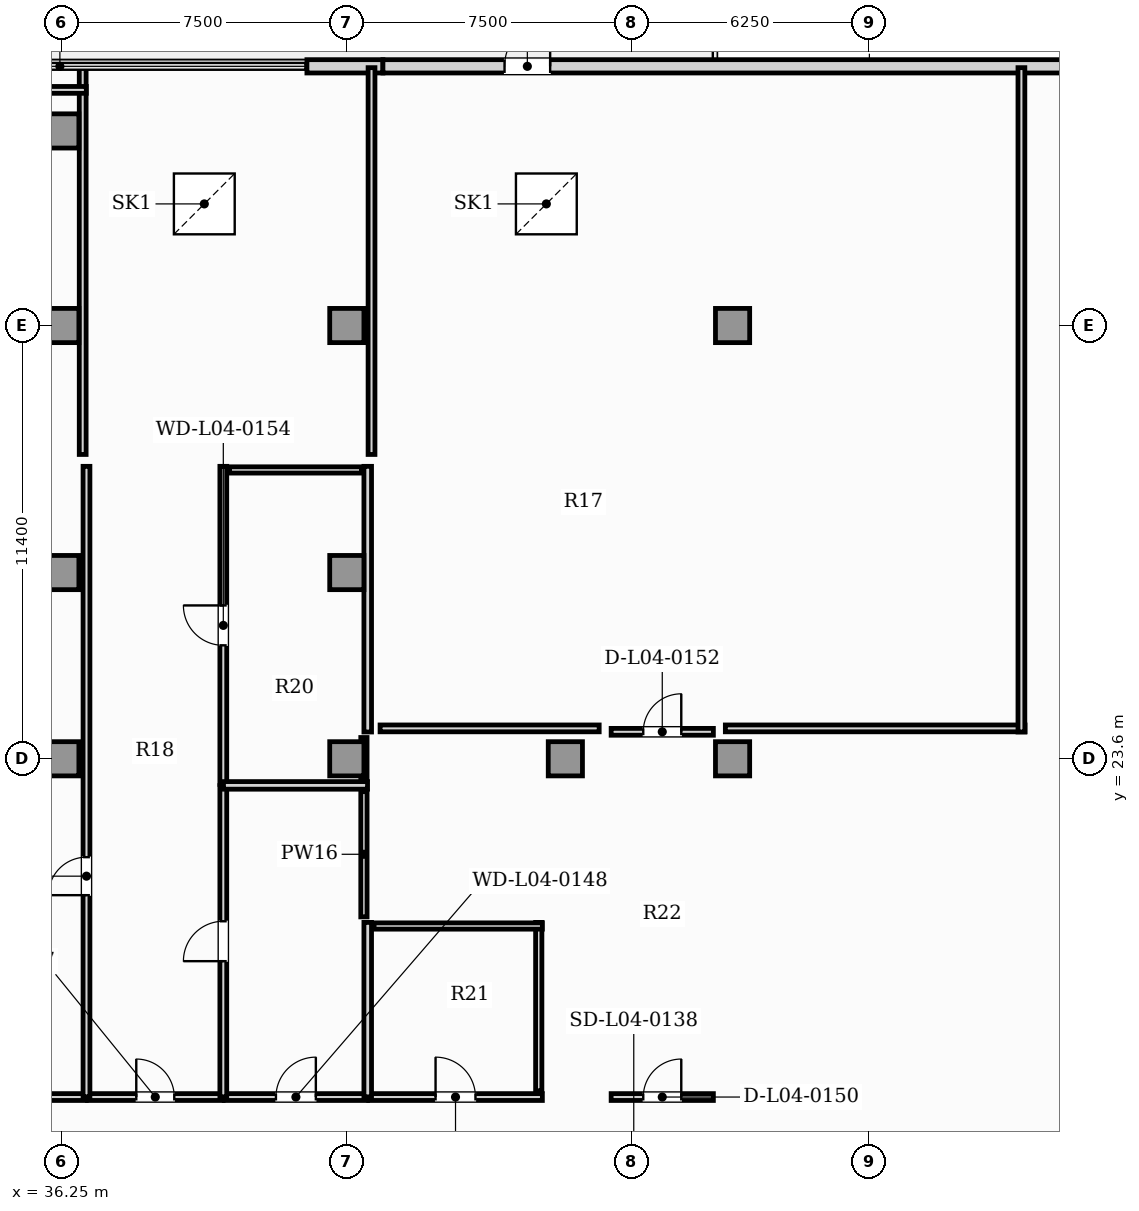
"""IFC4 building model, lengths in metres.
Left out: names, types, materials, properties, quantities, classifications, styles, units other than length and angle.
Written with IfcOpenShell. Run it as: python <this file> out.ifc"""

import sys

from ifc_helpers import new_model, si_unit, direction, frame, frame_2d, origin, origin_2d, place, context, subcontext, project, spatial, rectangle, extrude, element, fill, save


model = new_model("IFC4")
c1 = context("Model", 3, precision=1e-05, world=origin(), true_north=direction((0.0, 1.0)))
c2 = subcontext(c1, "Body", "Model", "MODEL_VIEW")
j1 = project(units=[si_unit("LENGTHUNIT", "METRE"), si_unit("PLANEANGLEUNIT", "RADIAN")], contexts=[c1])
p1 = place(None, origin())
s1 = spatial("IfcSite", under=j1, at=p1, CompositionType="ELEMENT")
p2 = place(p1, origin())
s2 = spatial("IfcBuilding", under=s1, at=p2, CompositionType="ELEMENT")
p3 = place(p2, frame((0.0, 0.0, 19.8)))
s3 = spatial("IfcBuildingStorey", under=s2, at=p3, CompositionType="ELEMENT", Elevation=19.8)
for number, where, z_axis, x_axis in (
    (1, (43.75, 23.6, 0.0), (0.0, 0.0, 1.0), (1.0, 0.0, 0.0)),
    (2, (43.75, 35.0, 0.0), (0.0, 0.0, 1.0), (1.0, 0.0, 0.0)),
    (3, (53.9, 23.6, 0.0), (0.0, 0.0, 1.0), (1.0, 0.0, 0.0)),
    (4, (53.9, 35.0, 0.0), (0.0, 0.0, 1.0), (1.0, 0.0, 0.0)),
    (5, (36.25, 23.6, 0.0), (0.0, 0.0, 1.0), (1.0, 0.0, 0.0)),
    (6, (49.5, 23.6, 0.0), (0.0, 0.0, 1.0), (1.0, 0.0, 0.0)),
    (7, (36.25, 28.5, 0.0), (0.0, 0.0, 1.0), (1.0, 0.0, 0.0)),
    (8, (43.75, 28.5, 0.0), (0.0, 0.0, 1.0), (1.0, 0.0, 0.0)),
    (9, (36.25, 35.0, 0.0), (0.0, 0.0, 1.0), (1.0, 0.0, 0.0)),
    (10, (36.25, 40.12, 0.0), (0.0, 0.0, 1.0), (1.0, 0.0, 0.0)),
):
    element("IfcColumn", number, at=place(p3, frame(where, z_axis=z_axis, x_axis=x_axis)), inside=s3, PredefinedType="COLUMN", context=c2, shape_type="SweptSolid", body=[
        extrude(rectangle(XDim=0.9, YDim=0.9, at=origin_2d()), origin(), (0.0, 0.0, 1.0), 4.8),
    ])
p4 = place(p3, frame((42.7, 41.82, 0.0), z_axis=(0.0, 0.0, 1.0), x_axis=(1.0, 0.0, 0.0)))
e11 = element("IfcWall", 11, at=p4, inside=s3, PredefinedType="SOLIDWALL", context=c2, shape_type="SweptSolid", body=[
    extrude(rectangle(XDim=2.0, YDim=0.35, at=frame_2d((1.0, 0.0))), origin(), (0.0, 0.0, 1.0), 4.4),
])
p5 = place(p3, frame((44.7, 41.82, 0.0), z_axis=(0.0, 0.0, 1.0), x_axis=(1.0, 0.0, 0.0)))
e12 = element("IfcWall", 12, at=p5, inside=s3, PredefinedType="SOLIDWALL", context=c2, shape_type="SweptSolid", body=[
    extrude(rectangle(XDim=21.96, YDim=0.35, at=frame_2d((10.98, 0.0))), origin(), (0.0, 0.0, 1.0), 4.4),
])
p6 = place(p5, frame((3.2, 0.0, 0.0)))
e13 = element("IfcOpeningElement", 13, at=p6, cuts=e12, PredefinedType="OPENING", context=c2, shape_type="SweptSolid", body=[
    extrude(rectangle(XDim=1.2, YDim=2.2, at=frame_2d((0.6, 1.1))), frame((0.0, 0.185, 0.0), z_axis=(0.0, -1.0, 0.0), x_axis=(1.0, 0.0, 0.0)), (0.0, 0.0, 1.0), 0.37),
])
p7 = place(p3, frame((13.225, 14.7, 0.0), z_axis=(0.0, 0.0, 1.0), x_axis=(1.0, 0.0, 0.0)))
e14 = element("IfcWall", 14, at=p7, inside=s3, PredefinedType="PARTITIONING", context=c2, shape_type="SweptSolid", body=[
    extrude(rectangle(XDim=23.67, YDim=0.18, at=frame_2d((11.835, 0.0))), origin(), (0.0, 0.0, 1.0), 4.4),
])
p8 = place(p7, frame((11.335, 0.0, 0.0)))
e15 = element("IfcOpeningElement", 15, at=p8, cuts=e14, PredefinedType="OPENING", context=c2, shape_type="SweptSolid", body=[
    extrude(rectangle(XDim=1.0, YDim=2.15, at=frame_2d((0.5, 1.075))), frame((0.0, 0.1, 0.0), z_axis=(0.0, -1.0, 0.0), x_axis=(1.0, 0.0, 0.0)), (0.0, 0.0, 1.0), 0.2),
])
p9 = place(p3, frame((36.925, 14.7, 0.0), z_axis=(0.0, 0.0, 1.0), x_axis=(1.0, 0.0, 0.0)))
e16 = element("IfcWall", 16, at=p9, inside=s3, PredefinedType="PARTITIONING", context=c2, shape_type="SweptSolid", body=[
    extrude(rectangle(XDim=3.57, YDim=0.18, at=frame_2d((1.785, 0.0))), origin(), (0.0, 0.0, 1.0), 4.4),
])
p10 = place(p9, frame((1.285, 0.0, 0.0)))
e17 = element("IfcOpeningElement", 17, at=p10, cuts=e16, PredefinedType="OPENING", context=c2, shape_type="SweptSolid", body=[
    extrude(rectangle(XDim=1.0, YDim=2.15, at=frame_2d((0.5, 1.075))), frame((0.0, 0.1, 0.0), z_axis=(0.0, -1.0, 0.0), x_axis=(1.0, 0.0, 0.0)), (0.0, 0.0, 1.0), 0.2),
])
p11 = place(p3, frame((40.525, 14.7, 0.0), z_axis=(0.0, 0.0, 1.0), x_axis=(1.0, 0.0, 0.0)))
e18 = element("IfcWall", 18, at=p11, inside=s3, PredefinedType="PARTITIONING", context=c2, shape_type="SweptSolid", body=[
    extrude(rectangle(XDim=3.77, YDim=0.18, at=frame_2d((1.885, 0.0))), origin(), (0.0, 0.0, 1.0), 4.4),
])
p12 = place(p11, frame((1.36, 0.0, 0.0)))
e19 = element("IfcOpeningElement", 19, at=p12, cuts=e18, PredefinedType="OPENING", context=c2, shape_type="SweptSolid", body=[
    extrude(rectangle(XDim=1.05, YDim=2.15, at=frame_2d((0.525, 1.075))), frame((0.0, 0.1, 0.0), z_axis=(0.0, -1.0, 0.0), x_axis=(1.0, 0.0, 0.0)), (0.0, 0.0, 1.0), 0.2),
])
p13 = place(p3, frame((44.325, 14.7, 0.0), z_axis=(0.0, 0.0, 1.0), x_axis=(1.0, 0.0, 0.0)))
e20 = element("IfcWall", 20, at=p13, inside=s3, PredefinedType="PARTITIONING", context=c2, shape_type="SweptSolid", body=[
    extrude(rectangle(XDim=4.57, YDim=0.18, at=frame_2d((2.285, 0.0))), origin(), (0.0, 0.0, 1.0), 4.4),
])
p14 = place(p13, frame((1.76, 0.0, 0.0)))
e21 = element("IfcOpeningElement", 21, at=p14, cuts=e20, PredefinedType="OPENING", context=c2, shape_type="SweptSolid", body=[
    extrude(rectangle(XDim=1.05, YDim=2.15, at=frame_2d((0.525, 1.075))), frame((0.0, 0.1, 0.0), z_axis=(0.0, -1.0, 0.0), x_axis=(1.0, 0.0, 0.0)), (0.0, 0.0, 1.0), 0.2),
])
p15 = place(p3, frame((50.705, 14.7, 0.0), z_axis=(0.0, 0.0, 1.0), x_axis=(1.0, 0.0, 0.0)))
e22 = element("IfcWall", 22, at=p15, inside=s3, PredefinedType="PARTITIONING", context=c2, shape_type="SweptSolid", body=[
    extrude(rectangle(XDim=2.69, YDim=0.18, at=frame_2d((1.345, 0.0))), origin(), (0.0, 0.0, 1.0), 4.4),
])
p16 = place(p15, frame((0.845, 0.0, 0.0)))
e23 = element("IfcOpeningElement", 23, at=p16, cuts=e22, PredefinedType="OPENING", context=c2, shape_type="SweptSolid", body=[
    extrude(rectangle(XDim=1.0, YDim=2.15, at=frame_2d((0.5, 1.075))), frame((0.0, 0.1, 0.0), z_axis=(0.0, -1.0, 0.0), x_axis=(1.0, 0.0, 0.0)), (0.0, 0.0, 1.0), 0.2),
])
p17 = place(p3, frame((36.9, 14.705, 0.0), z_axis=(0.0, 0.0, 1.0), x_axis=(0.0, 1.0, 0.0)))
e24 = element("IfcWall", 24, at=p17, inside=s3, PredefinedType="PARTITIONING", context=c2, shape_type="SweptSolid", body=[
    extrude(rectangle(XDim=16.59, YDim=0.18, at=frame_2d((8.295, 0.0))), origin(), (0.0, 0.0, 1.0), 4.4),
])
p18 = place(p17, frame((5.306, 0.0, 0.0)))
e25 = element("IfcOpeningElement", 25, at=p18, cuts=e24, PredefinedType="OPENING", context=c2, shape_type="SweptSolid", body=[
    extrude(rectangle(XDim=1.0, YDim=2.15, at=frame_2d((0.5, 1.075))), frame((0.0, 0.1, 0.0), z_axis=(0.0, -1.0, 0.0), x_axis=(1.0, 0.0, 0.0)), (0.0, 0.0, 1.0), 0.2),
])
p19 = place(p3, frame((44.3, 24.305, 0.0), z_axis=(0.0, 0.0, 1.0), x_axis=(0.0, 1.0, 0.0)))
e26 = element("IfcWall", 26, at=p19, inside=s3, PredefinedType="PARTITIONING", context=c2, shape_type="SweptSolid", body=[
    extrude(rectangle(XDim=6.99, YDim=0.2, at=frame_2d((3.495, 0.0))), origin(), (0.0, 0.0, 1.0), 4.4),
])
p20 = place(p3, frame((50.705, 24.31, 0.0), z_axis=(0.0, 0.0, 1.0), x_axis=(1.0, 0.0, 0.0)))
e27 = element("IfcWall", 27, at=p20, inside=s3, PredefinedType="PARTITIONING", context=c2, shape_type="SweptSolid", body=[
    extrude(rectangle(XDim=2.69, YDim=0.18, at=frame_2d((1.345, 0.0))), origin(), (0.0, 0.0, 1.0), 4.4),
])
p21 = place(p20, frame((0.845, 0.0, 0.0)))
e28 = element("IfcOpeningElement", 28, at=p21, cuts=e27, PredefinedType="OPENING", context=c2, shape_type="SweptSolid", body=[
    extrude(rectangle(XDim=1.0, YDim=2.15, at=frame_2d((0.5, 1.075))), frame((0.0, 0.1, 0.0), z_axis=(0.0, -1.0, 0.0), x_axis=(1.0, 0.0, 0.0)), (0.0, 0.0, 1.0), 0.2),
])
p22 = place(p3, frame((40.5, 14.705, 0.0), z_axis=(0.0, 0.0, 1.0), x_axis=(0.0, 1.0, 0.0)))
e29 = element("IfcWall", 29, at=p22, inside=s3, PredefinedType="PARTITIONING", context=c2, shape_type="SweptSolid", body=[
    extrude(rectangle(XDim=8.19, YDim=0.18, at=frame_2d((4.095, 0.0))), origin(), (0.0, 0.0, 1.0), 4.4),
])
p23 = place(p22, frame((3.57, 0.0, 0.0)))
e30 = element("IfcOpeningElement", 30, at=p23, cuts=e29, PredefinedType="OPENING", context=c2, shape_type="SweptSolid", body=[
    extrude(rectangle(XDim=1.05, YDim=2.15, at=frame_2d((0.525, 1.075))), frame((0.0, 0.1, 0.0), z_axis=(0.0, -1.0, 0.0), x_axis=(1.0, 0.0, 0.0)), (0.0, 0.0, 1.0), 0.2),
])
p24 = place(p3, frame((40.5, 22.925, 0.0), z_axis=(0.0, 0.0, 1.0), x_axis=(0.0, 1.0, 0.0)))
e31 = element("IfcWall", 31, at=p24, inside=s3, PredefinedType="PARTITIONING", context=c2, shape_type="SweptSolid", body=[
    extrude(rectangle(XDim=8.37, YDim=0.18, at=frame_2d((4.185, 0.0))), origin(), (0.0, 0.0, 1.0), 4.4),
])
p25 = place(p24, frame((3.66, 0.0, 0.0)))
e32 = element("IfcOpeningElement", 32, at=p25, cuts=e31, PredefinedType="OPENING", context=c2, shape_type="SweptSolid", body=[
    extrude(rectangle(XDim=1.05, YDim=2.15, at=frame_2d((0.525, 1.075))), frame((0.0, 0.1, 0.0), z_axis=(0.0, -1.0, 0.0), x_axis=(1.0, 0.0, 0.0)), (0.0, 0.0, 1.0), 0.2),
])
p26 = place(p3, frame((40.505, 22.9, 0.0), z_axis=(0.0, 0.0, 1.0), x_axis=(1.0, 0.0, 0.0)))
e33 = element("IfcWall", 33, at=p26, inside=s3, PredefinedType="PARTITIONING", context=c2, shape_type="SweptSolid", body=[
    extrude(rectangle(XDim=3.79, YDim=0.2, at=frame_2d((1.895, 0.0))), origin(), (0.0, 0.0, 1.0), 4.4),
])
p27 = place(p3, frame((44.3, 14.705, 0.0), z_axis=(0.0, 0.0, 1.0), x_axis=(0.0, 1.0, 0.0)))
e34 = element("IfcWall", 34, at=p27, inside=s3, PredefinedType="PARTITIONING", context=c2, shape_type="SweptSolid", body=[
    extrude(rectangle(XDim=4.59, YDim=0.2, at=frame_2d((2.295, 0.0))), origin(), (0.0, 0.0, 1.0), 4.4),
])
p28 = place(p3, frame((36.8, 31.607, 0.0), z_axis=(0.0, 0.0, 1.0), x_axis=(0.0, 1.0, 0.0)))
e35 = element("IfcWall", 35, at=p28, inside=s3, PredefinedType="PARTITIONING", context=c2, shape_type="SweptSolid", body=[
    extrude(rectangle(XDim=10.195, YDim=0.18, at=frame_2d((5.097, 0.0))), origin(), (0.0, 0.0, 1.0), 4.4),
])
p29 = place(p3, frame((36.895, 41.2, 0.0), z_axis=(0.0, 0.0, 1.0), x_axis=(-1.0, 0.0, 0.0)))
e36 = element("IfcWall", 36, at=p29, inside=s3, PredefinedType="PARTITIONING", context=c2, shape_type="SweptSolid", body=[
    extrude(rectangle(XDim=6.206, YDim=0.18, at=frame_2d((3.103, 0.0))), origin(), (0.0, 0.0, 1.0), 4.4),
])
p30 = place(p3, frame((44.625, 24.4, 0.0), z_axis=(0.0, 0.0, 1.0), x_axis=(1.0, 0.0, 0.0)))
e37 = element("IfcWall", 37, at=p30, inside=s3, PredefinedType="PARTITIONING", context=c2, shape_type="SweptSolid", body=[
    extrude(rectangle(XDim=5.765, YDim=0.18, at=frame_2d((2.883, 0.0))), origin(), (0.0, 0.0, 1.0), 4.4),
])
p31 = place(p3, frame((53.71, 24.4, 0.0), z_axis=(0.0, 0.0, 1.0), x_axis=(1.0, 0.0, 0.0)))
e38 = element("IfcWall", 38, at=p31, inside=s3, PredefinedType="PARTITIONING", context=c2, shape_type="SweptSolid", body=[
    extrude(rectangle(XDim=7.885, YDim=0.18, at=frame_2d((3.942, 0.0))), origin(), (0.0, 0.0, 1.0), 4.4),
])
p32 = place(p3, frame((61.5, 24.305, 0.0), z_axis=(0.0, 0.0, 1.0), x_axis=(0.0, 1.0, 0.0)))
e39 = element("IfcWall", 39, at=p32, inside=s3, PredefinedType="PARTITIONING", context=c2, shape_type="SweptSolid", body=[
    extrude(rectangle(XDim=17.48, YDim=0.18, at=frame_2d((8.74, 0.0))), origin(), (0.0, 0.0, 1.0), 4.4),
])
p33 = place(p3, frame((44.4, 41.785, 0.0), z_axis=(0.0, 0.0, 1.0), x_axis=(0.0, -1.0, 0.0)))
e40 = element("IfcWall", 40, at=p33, inside=s3, PredefinedType="PARTITIONING", context=c2, shape_type="SweptSolid", body=[
    extrude(rectangle(XDim=10.177, YDim=0.18, at=frame_2d((5.089, 0.0))), origin(), (0.0, 0.0, 1.0), 4.4),
])
p34 = place(p3, frame((44.2, 19.44, 0.0), z_axis=(0.0, 0.0, 1.0), x_axis=(0.0, 1.0, 0.0)))
e41 = element("IfcWall", 41, at=p34, inside=s3, PredefinedType="PLUMBINGWALL", context=c2, shape_type="SweptSolid", body=[
    extrude(rectangle(XDim=3.295, YDim=0.165, at=frame_2d((1.647, 0.0))), origin(), (0.0, 0.0, 1.0), 4.4),
])
p35 = place(p3, frame((44.2, 23.065, 0.0), z_axis=(0.0, 0.0, 1.0), x_axis=(0.0, 1.0, 0.0)))
e42 = element("IfcWall", 42, at=p35, inside=s3, PredefinedType="PLUMBINGWALL", context=c2, shape_type="SweptSolid", body=[
    extrude(rectangle(XDim=1.095, YDim=0.165, at=frame_2d((0.547, 0.0))), origin(), (0.0, 0.0, 1.0), 4.4),
])
p36 = place(p3, frame((44.135, 31.2, 0.0), z_axis=(0.0, 0.0, 1.0), x_axis=(-1.0, 0.0, 0.0)))
e43 = element("IfcWall", 43, at=p36, inside=s3, PredefinedType="PLUMBINGWALL", context=c2, shape_type="SweptSolid", body=[
    extrude(rectangle(XDim=3.47, YDim=0.165, at=frame_2d((1.735, 0.0))), origin(), (0.0, 0.0, 1.0), 4.4),
])
for number, where, z_axis, x_axis in (
    (44, (48.8, 14.865, 0.0), (0.0, 0.0, 1.0), (0.0, 1.0, 0.0)),
    (45, (48.895, 19.2, 0.0), (0.0, 0.0, 1.0), (-1.0, 0.0, 0.0)),
):
    element("IfcWall", number, at=place(p3, frame(where, z_axis=z_axis, x_axis=x_axis)), inside=s3, PredefinedType="PLUMBINGWALL", context=c2, shape_type="SweptSolid", body=[
        extrude(rectangle(XDim=4.43, YDim=0.165, at=frame_2d((2.215, 0.0))), origin(), (0.0, 0.0, 1.0), 4.4),
    ])
p37 = place(p6, origin())
e46 = element("IfcDoor", 46, at=p37, inside=s3, OperationType="SINGLE_SWING_RIGHT", PredefinedType="DOOR", context=c2, shape_type="SweptSolid", body=[
    extrude(rectangle(XDim=1.2, YDim=2.2, at=frame_2d((0.6, 1.1))), frame((0.0, 0.025, 0.0), z_axis=(0.0, -1.0, 0.0), x_axis=(1.0, 0.0, 0.0)), (0.0, 0.0, 1.0), 0.05),
])
fill(e13, e46)
p38 = place(p3, frame((0.0, 0.0, -0.3)))
p39 = place(p38, frame((40.0, 38.2, 0.25)))
e47 = element("IfcWindow", 47, at=p39, inside=s3, PartitioningType="SINGLE_PANEL", PredefinedType="SKYLIGHT", context=c2, shape_type="SweptSolid", body=[
    extrude(rectangle(XDim=1.6, YDim=1.6, at=origin_2d()), origin(), (0.0, 0.0, 1.0), 0.05),
])
p40 = place(p38, frame((49.0, 38.2, 0.25)))
e48 = element("IfcWindow", 48, at=p40, inside=s3, PartitioningType="SINGLE_PANEL", PredefinedType="SKYLIGHT", context=c2, shape_type="SweptSolid", body=[
    extrude(rectangle(XDim=1.6, YDim=1.6, at=origin_2d()), origin(), (0.0, 0.0, 1.0), 0.05),
])
p41 = place(p10, origin())
e49 = element("IfcDoor", 49, at=p41, inside=s3, OperationType="SINGLE_SWING_LEFT", PredefinedType="DOOR", context=c2, shape_type="SweptSolid", body=[
    extrude(rectangle(XDim=1.0, YDim=2.15, at=frame_2d((0.5, 1.075))), frame((0.0, 0.025, 0.0), z_axis=(0.0, -1.0, 0.0), x_axis=(1.0, 0.0, 0.0)), (0.0, 0.0, 1.0), 0.05),
])
fill(e17, e49)
p42 = place(p12, origin())
e50 = element("IfcDoor", 50, at=p42, inside=s3, OperationType="SINGLE_SWING_RIGHT", PredefinedType="DOOR", context=c2, shape_type="SweptSolid", body=[
    extrude(rectangle(XDim=1.05, YDim=2.15, at=frame_2d((0.525, 1.075))), frame((0.0, 0.025, 0.0), z_axis=(0.0, -1.0, 0.0), x_axis=(1.0, 0.0, 0.0)), (0.0, 0.0, 1.0), 0.05),
])
fill(e19, e50)
p43 = place(p14, origin())
e51 = element("IfcDoor", 51, at=p43, inside=s3, OperationType="SINGLE_SWING_LEFT", PredefinedType="DOOR", context=c2, shape_type="SweptSolid", body=[
    extrude(rectangle(XDim=1.05, YDim=2.15, at=frame_2d((0.525, 1.075))), frame((0.0, 0.025, 0.0), z_axis=(0.0, -1.0, 0.0), x_axis=(1.0, 0.0, 0.0)), (0.0, 0.0, 1.0), 0.05),
])
fill(e21, e51)
p44 = place(p16, origin())
e52 = element("IfcDoor", 52, at=p44, inside=s3, OperationType="SINGLE_SWING_RIGHT", PredefinedType="DOOR", context=c2, shape_type="SweptSolid", body=[
    extrude(rectangle(XDim=1.0, YDim=2.15, at=frame_2d((0.5, 1.075))), frame((0.0, 0.025, 0.0), z_axis=(0.0, -1.0, 0.0), x_axis=(1.0, 0.0, 0.0)), (0.0, 0.0, 1.0), 0.05),
])
fill(e23, e52)
p45 = place(p18, origin())
e53 = element("IfcDoor", 53, at=p45, inside=s3, OperationType="SINGLE_SWING_LEFT", PredefinedType="DOOR", context=c2, shape_type="SweptSolid", body=[
    extrude(rectangle(XDim=1.0, YDim=2.15, at=frame_2d((0.5, 1.075))), frame((0.0, 0.025, 0.0), z_axis=(0.0, -1.0, 0.0), x_axis=(1.0, 0.0, 0.0)), (0.0, 0.0, 1.0), 0.05),
])
fill(e25, e53)
p46 = place(p21, origin())
e54 = element("IfcDoor", 54, at=p46, inside=s3, OperationType="SINGLE_SWING_RIGHT", PredefinedType="DOOR", context=c2, shape_type="SweptSolid", body=[
    extrude(rectangle(XDim=1.0, YDim=2.15, at=frame_2d((0.5, 1.075))), frame((0.0, 0.025, 0.0), z_axis=(0.0, -1.0, 0.0), x_axis=(1.0, 0.0, 0.0)), (0.0, 0.0, 1.0), 0.05),
])
fill(e28, e54)
p47 = place(p23, origin())
e55 = element("IfcDoor", 55, at=p47, inside=s3, OperationType="SINGLE_SWING_LEFT", PredefinedType="DOOR", context=c2, shape_type="SweptSolid", body=[
    extrude(rectangle(XDim=1.05, YDim=2.15, at=frame_2d((0.525, 1.075))), frame((0.0, 0.025, 0.0), z_axis=(0.0, -1.0, 0.0), x_axis=(1.0, 0.0, 0.0)), (0.0, 0.0, 1.0), 0.05),
])
fill(e30, e55)
p48 = place(p25, origin())
e56 = element("IfcDoor", 56, at=p48, inside=s3, OperationType="SINGLE_SWING_RIGHT", PredefinedType="DOOR", context=c2, shape_type="SweptSolid", body=[
    extrude(rectangle(XDim=1.05, YDim=2.15, at=frame_2d((0.525, 1.075))), frame((0.0, 0.025, 0.0), z_axis=(0.0, -1.0, 0.0), x_axis=(1.0, 0.0, 0.0)), (0.0, 0.0, 1.0), 0.05),
])
fill(e32, e56)
save(model, sys.argv[1])
